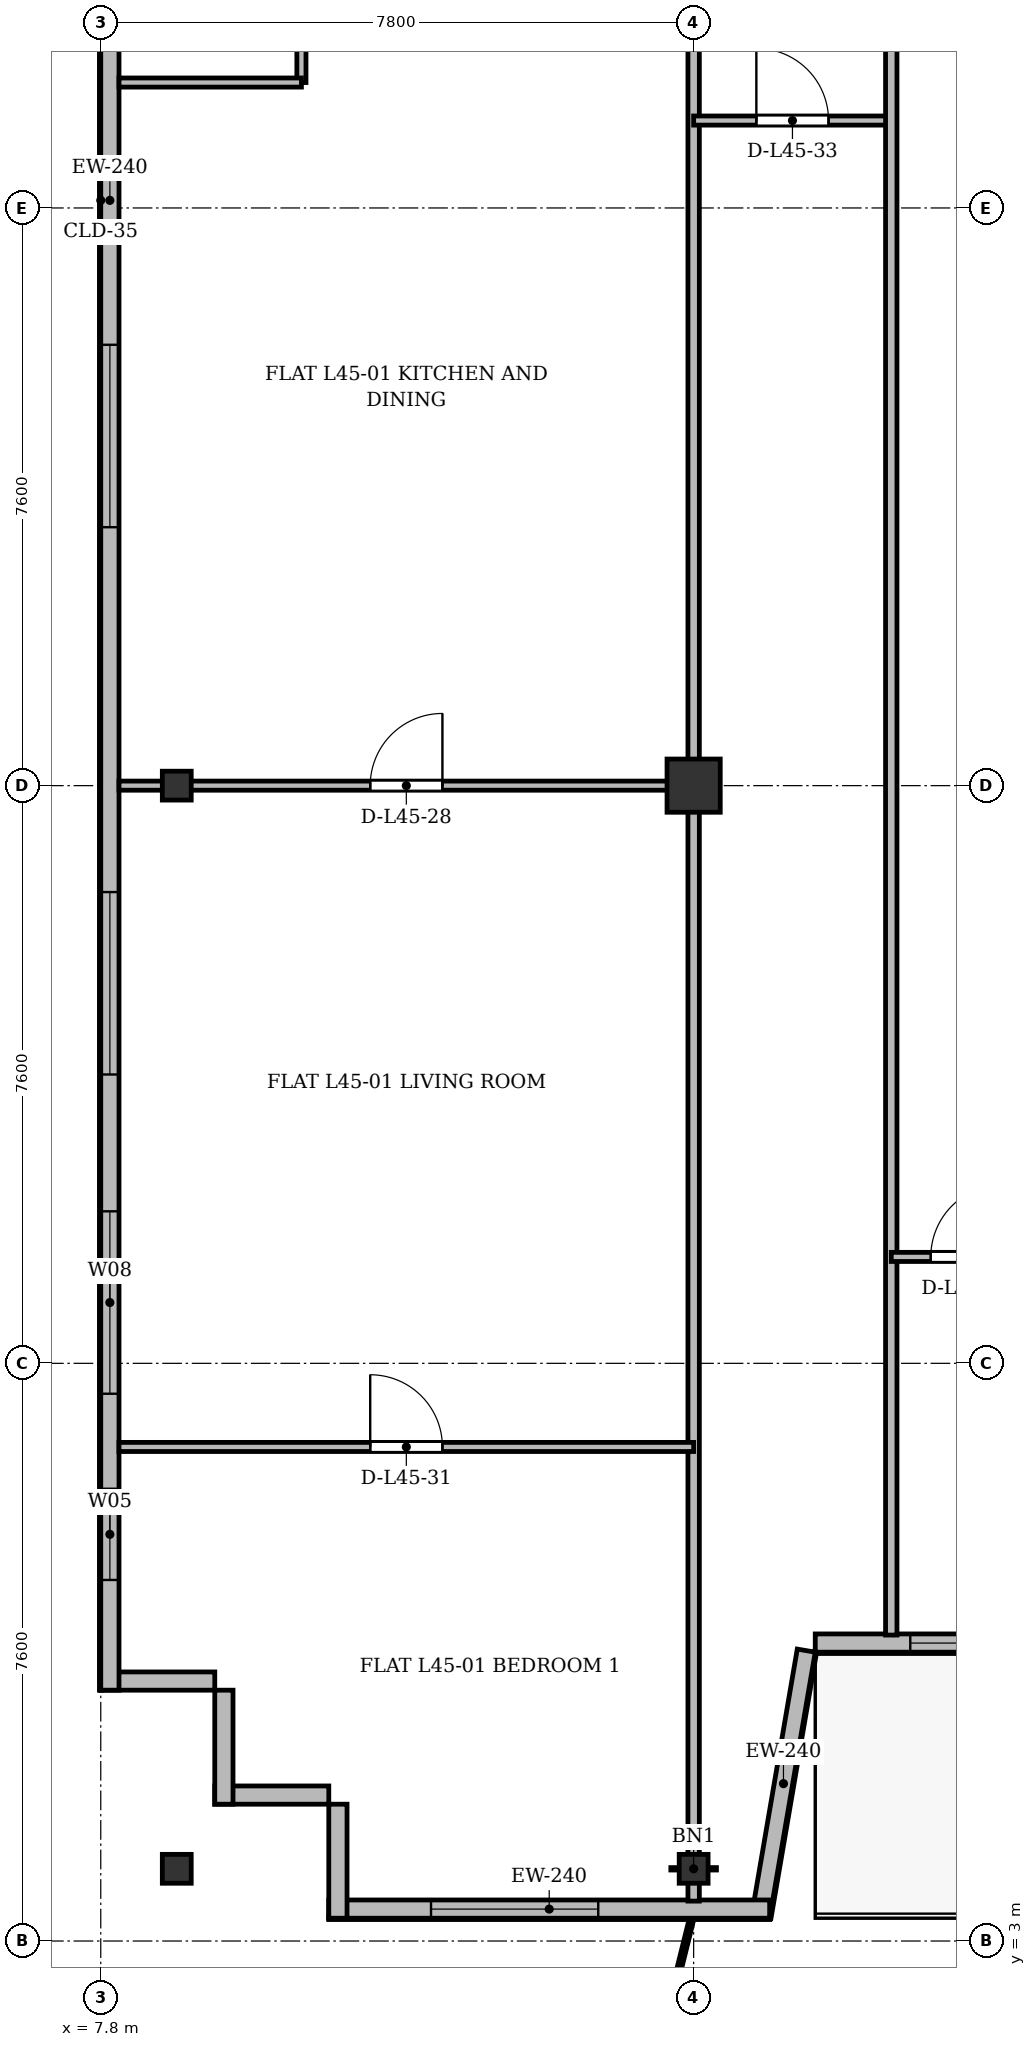
"""IFC4 building model, lengths in metres.
Left out: names, types, materials, properties, quantities, classifications, styles, units other than length and angle.
Written with IfcOpenShell. Run it as: python <this file> out.ifc"""

import sys

from ifc_helpers import new_model, si_unit, direction, frame, frame_2d, origin, origin_2d, place, context, subcontext, project, spatial, rectangle, i_section, extrude, source, transform, mapped, element, fill, save


model = new_model("IFC4")
c1 = context("Model", 3, precision=1e-05, world=origin(), true_north=direction((0.0, 1.0)))
c2 = subcontext(c1, "Body", "Model", "MODEL_VIEW")
j1 = project(units=[si_unit("LENGTHUNIT", "METRE"), si_unit("PLANEANGLEUNIT", "RADIAN")], contexts=[c1])
p1 = place(None, origin())
s1 = spatial("IfcSite", under=j1, at=p1, CompositionType="ELEMENT")
p2 = place(p1, origin())
s2 = spatial("IfcBuilding", under=s1, at=p2, CompositionType="ELEMENT")
p3 = place(p2, frame((0.0, 0.0, 171.7)))
s3 = spatial("IfcBuildingStorey", under=s2, at=p3, CompositionType="ELEMENT", Elevation=171.7)
m1 = source(origin(), c2, "Body", "SweptSolid", [
    extrude(i_section(OverallWidth=0.38, OverallDepth=0.38, WebThickness=0.02, FlangeThickness=0.03, at=origin_2d()), origin(), (0.0, 0.0, 1.0), 3.6),
])
for number, where, z_axis, x_axis in (
    (1, (8.8, 3.95, 0.0), (0.0, 0.0, 1.0), (1.0, 0.0, 0.0)),
    (2, (8.8, 18.2, 0.0), (0.0, 0.0, 1.0), (1.0, 0.0, 0.0)),
    (3, (15.6, 3.95, 0.0), (0.0, 0.0, 1.0), (1.0, 0.0, 0.0)),
):
    element("IfcColumn", number, at=place(p3, frame(where, z_axis=z_axis, x_axis=x_axis)), inside=s3, PredefinedType="COLUMN", context=c2, shape_type="MappedRepresentation", body=[
        mapped(m1, transform((0.0, 0.0, 0.0), x_axis=(1.0, 0.0, 0.0), y_axis=(0.0, 1.0, 0.0), z_axis=(0.0, 0.0, 1.0), scale=1.0)),
    ])
m2 = source(origin(), c2, "Body", "SweptSolid", [
    extrude(rectangle(XDim=0.7, YDim=0.7, at=origin_2d()), origin(), (0.0, 0.0, 1.0), 3.6),
])
p4 = place(p3, frame((15.6, 18.2, 0.0), z_axis=(0.0, 0.0, 1.0), x_axis=(1.0, 0.0, 0.0)))
e4 = element("IfcColumn", 4, at=p4, inside=s3, PredefinedType="COLUMN", context=c2, shape_type="MappedRepresentation", body=[
    mapped(m2, transform((0.0, 0.0, 0.0), x_axis=(1.0, 0.0, 0.0), y_axis=(0.0, 1.0, 0.0), z_axis=(0.0, 0.0, 1.0), scale=1.0)),
])
for number, where, z_axis, x_axis in (
    (5, (10.8, 4.92, 0.0), (0.0, 0.0, 1.0), (-1.0, 0.0, 0.0)),
    (6, (9.42, 4.8, 0.0), (0.0, 0.0, 1.0), (0.0, 1.0, 0.0)),
):
    element("IfcWall", number, at=place(p3, frame(where, z_axis=z_axis, x_axis=x_axis)), inside=s3, PredefinedType="SOLIDWALL", context=c2, shape_type="SweptSolid", body=[
        extrude(rectangle(XDim=1.5, YDim=0.24, at=frame_2d((0.75, 0.0))), origin(), (0.0, 0.0, 1.0), 3.35),
    ])
p5 = place(p3, frame((9.3, 6.42, 0.0), z_axis=(0.0, 0.0, 1.0), x_axis=(-1.0, 0.0, 0.0)))
e7 = element("IfcWall", 7, at=p5, inside=s3, PredefinedType="SOLIDWALL", context=c2, shape_type="SweptSolid", body=[
    extrude(rectangle(XDim=1.5, YDim=0.24, at=frame_2d((0.75, 0.0))), origin(), (0.0, 0.0, 1.0), 2.85),
])
p6 = place(p3, frame((7.92, 6.3, 0.0), z_axis=(0.0, 0.0, 1.0), x_axis=(0.0, 1.0, 0.0)))
e8 = element("IfcWall", 8, at=p6, inside=s3, PredefinedType="SOLIDWALL", context=c2, shape_type="SweptSolid", body=[
    extrude(rectangle(XDim=39.2, YDim=0.24, at=frame_2d((19.6, 0.0))), origin(), (0.0, 0.0, 1.0), 3.35),
])
p7 = place(p6, frame((1.45, 0.0, 0.92)))
e9 = element("IfcOpeningElement", 9, at=p7, cuts=e8, PredefinedType="OPENING", context=c2, shape_type="SweptSolid", body=[
    extrude(rectangle(XDim=1.2, YDim=1.65, at=frame_2d((0.6, 0.825))), frame((0.0, 0.13, 0.0), z_axis=(0.0, -1.0, 0.0), x_axis=(1.0, 0.0, 0.0)), (0.0, 0.0, 1.0), 0.26),
])
p8 = place(p6, frame((3.9, 0.0, 0.92)))
e10 = element("IfcOpeningElement", 10, at=p8, cuts=e8, PredefinedType="OPENING", context=c2, shape_type="SweptSolid", body=[
    extrude(rectangle(XDim=2.4, YDim=2.1, at=frame_2d((1.2, 1.05))), frame((0.0, 0.13, 0.0), z_axis=(0.0, -1.0, 0.0), x_axis=(1.0, 0.0, 0.0)), (0.0, 0.0, 1.0), 0.26),
])
p9 = place(p6, frame((8.1, 0.0, 0.92)))
e11 = element("IfcOpeningElement", 11, at=p9, cuts=e8, PredefinedType="OPENING", context=c2, shape_type="SweptSolid", body=[
    extrude(rectangle(XDim=2.4, YDim=2.1, at=frame_2d((1.2, 1.05))), frame((0.0, 0.13, 0.0), z_axis=(0.0, -1.0, 0.0), x_axis=(1.0, 0.0, 0.0)), (0.0, 0.0, 1.0), 0.26),
])
p10 = place(p6, frame((15.3, 0.0, 0.92)))
e12 = element("IfcOpeningElement", 12, at=p10, cuts=e8, PredefinedType="OPENING", context=c2, shape_type="SweptSolid", body=[
    extrude(rectangle(XDim=2.4, YDim=2.1, at=frame_2d((1.2, 1.05))), frame((0.0, 0.13, 0.0), z_axis=(0.0, -1.0, 0.0), x_axis=(1.0, 0.0, 0.0)), (0.0, 0.0, 1.0), 0.26),
])
p11 = place(p6, frame((33.5, 0.0, 0.92)))
e13 = element("IfcOpeningElement", 13, at=p11, cuts=e8, PredefinedType="OPENING", context=c2, shape_type="SweptSolid", body=[
    extrude(rectangle(XDim=1.2, YDim=1.65, at=frame_2d((0.6, 0.825))), frame((0.0, 0.13, 0.0), z_axis=(0.0, -1.0, 0.0), x_axis=(1.0, 0.0, 0.0)), (0.0, 0.0, 1.0), 0.26),
])
p12 = place(p6, frame((36.85, 0.0, 0.92)))
e14 = element("IfcOpeningElement", 14, at=p12, cuts=e8, PredefinedType="OPENING", context=c2, shape_type="SweptSolid", body=[
    extrude(rectangle(XDim=1.2, YDim=1.65, at=frame_2d((0.6, 0.825))), frame((0.0, 0.13, 0.0), z_axis=(0.0, -1.0, 0.0), x_axis=(1.0, 0.0, 0.0)), (0.0, 0.0, 1.0), 0.26),
])
p13 = place(p3, frame((29.0, 6.92, 0.0), z_axis=(0.0, 0.0, 1.0), x_axis=(-1.0, 0.0, 0.0)))
e15 = element("IfcWall", 15, at=p13, inside=s3, PredefinedType="SOLIDWALL", context=c2, shape_type="SweptSolid", body=[
    extrude(rectangle(XDim=11.8, YDim=0.24, at=frame_2d((5.9, 0.0))), origin(), (0.0, 0.0, 1.0), 2.85),
])
p14 = place(p13, frame((0.745, 0.0, 0.9)))
e16 = element("IfcOpeningElement", 16, at=p14, cuts=e15, PredefinedType="OPENING", context=c2, shape_type="SweptSolid", body=[
    extrude(rectangle(XDim=1.8, YDim=1.8, at=frame_2d((0.9, 0.9))), frame((0.0, 0.13, 0.0), z_axis=(0.0, -1.0, 0.0), x_axis=(1.0, 0.0, 0.0)), (0.0, 0.0, 1.0), 0.26),
])
p15 = place(p13, frame((3.5, 0.0, 0.9)))
e17 = element("IfcOpeningElement", 17, at=p15, cuts=e15, PredefinedType="OPENING", context=c2, shape_type="SweptSolid", body=[
    extrude(rectangle(XDim=2.2, YDim=1.8, at=frame_2d((1.1, 0.9))), frame((0.0, 0.13, 0.0), z_axis=(0.0, -1.0, 0.0), x_axis=(1.0, 0.0, 0.0)), (0.0, 0.0, 1.0), 0.26),
])
p16 = place(p13, frame((6.65, 0.0, 0.9)))
e18 = element("IfcOpeningElement", 18, at=p16, cuts=e15, PredefinedType="OPENING", context=c2, shape_type="SweptSolid", body=[
    extrude(rectangle(XDim=1.5, YDim=1.75, at=frame_2d((0.75, 0.875))), frame((0.0, 0.13, 0.0), z_axis=(0.0, -1.0, 0.0), x_axis=(1.0, 0.0, 0.0)), (0.0, 0.0, 1.0), 0.26),
])
p17 = place(p13, frame((9.05, 0.0, 0.9)))
e19 = element("IfcOpeningElement", 19, at=p17, cuts=e15, PredefinedType="OPENING", context=c2, shape_type="SweptSolid", body=[
    extrude(rectangle(XDim=1.5, YDim=1.75, at=frame_2d((0.75, 0.875))), frame((0.0, 0.13, 0.0), z_axis=(0.0, -1.0, 0.0), x_axis=(1.0, 0.0, 0.0)), (0.0, 0.0, 1.0), 0.26),
])
p18 = place(p3, frame((17.082, 6.82, 0.0), z_axis=(0.0, 0.0, 1.0), x_axis=(-0.168990530437, -0.98561767467, 0.0)))
e20 = element("IfcWall", 20, at=p18, inside=s3, PredefinedType="SOLIDWALL", context=c2, shape_type="SweptSolid", body=[
    extrude(rectangle(XDim=3.551, YDim=0.24, at=frame_2d((1.775, 0.0))), origin(), (0.0, 0.0, 1.0), 2.75),
])
p19 = place(p3, frame((16.6, 3.42, 0.0), z_axis=(0.0, 0.0, 1.0), x_axis=(-1.0, 0.0, 0.0)))
e21 = element("IfcWall", 21, at=p19, inside=s3, PredefinedType="SOLIDWALL", context=c2, shape_type="SweptSolid", body=[
    extrude(rectangle(XDim=5.8, YDim=0.24, at=frame_2d((2.9, 0.0))), origin(), (0.0, 0.0, 1.0), 3.35),
])
p20 = place(p19, frame((2.255, 0.0, 0.9)))
e22 = element("IfcOpeningElement", 22, at=p20, cuts=e21, PredefinedType="OPENING", context=c2, shape_type="SweptSolid", body=[
    extrude(rectangle(XDim=2.2, YDim=1.8, at=frame_2d((1.1, 0.9))), frame((0.0, 0.13, 0.0), z_axis=(0.0, -1.0, 0.0), x_axis=(1.0, 0.0, 0.0)), (0.0, 0.0, 1.0), 0.26),
])
p21 = place(p3, frame((10.92, 3.3, 0.0), z_axis=(0.0, 0.0, 1.0), x_axis=(0.0, 1.0, 0.0)))
e23 = element("IfcWall", 23, at=p21, inside=s3, PredefinedType="SOLIDWALL", context=c2, shape_type="SweptSolid", body=[
    extrude(rectangle(XDim=1.5, YDim=0.24, at=frame_2d((0.75, 0.0))), origin(), (0.0, 0.0, 1.0), 2.75),
])
p22 = place(p3, frame((15.6, 3.525, 0.0), z_axis=(0.0, 0.0, 1.0), x_axis=(0.0, 1.0, 0.0)))
e24 = element("IfcWall", 24, at=p22, inside=s3, PredefinedType="PARTITIONING", context=c2, shape_type="SweptSolid", body=[
    extrude(rectangle(XDim=27.275, YDim=0.15, at=frame_2d((13.638, 0.0))), origin(), (0.0, 0.0, 1.0), 2.85),
])
p23 = place(p3, frame((8.04, 18.2, 0.0), z_axis=(0.0, 0.0, 1.0), x_axis=(1.0, 0.0, 0.0)))
e25 = element("IfcWall", 25, at=p23, inside=s3, PredefinedType="PARTITIONING", context=c2, shape_type="SweptSolid", body=[
    extrude(rectangle(XDim=7.56, YDim=0.12, at=frame_2d((3.78, 0.0))), origin(), (0.0, 0.0, 1.0), 2.75),
])
p24 = place(p23, frame((3.305, 0.0, 0.0)))
e26 = element("IfcOpeningElement", 26, at=p24, cuts=e25, PredefinedType="OPENING", context=c2, shape_type="SweptSolid", body=[
    extrude(rectangle(XDim=0.95, YDim=2.15, at=frame_2d((0.475, 1.075))), frame((0.0, 0.07, 0.0), z_axis=(0.0, -1.0, 0.0), x_axis=(1.0, 0.0, 0.0)), (0.0, 0.0, 1.0), 0.14),
])
p25 = place(p3, frame((10.44, 27.45, 0.0), z_axis=(0.0, 0.0, 1.0), x_axis=(0.0, 1.0, 0.0)))
e27 = element("IfcWall", 27, at=p25, inside=s3, PredefinedType="PARTITIONING", context=c2, shape_type="SweptSolid", body=[
    extrude(rectangle(XDim=3.35, YDim=0.12, at=frame_2d((1.675, 0.0))), origin(), (0.0, 0.0, 1.0), 3.35),
])
p26 = place(p25, frame((0.8, 0.0, 0.0)))
e28 = element("IfcOpeningElement", 28, at=p26, cuts=e27, PredefinedType="OPENING", context=c2, shape_type="SweptSolid", body=[
    extrude(rectangle(XDim=0.85, YDim=2.1, at=frame_2d((0.425, 1.05))), frame((0.0, 0.07, 0.0), z_axis=(0.0, -1.0, 0.0), x_axis=(1.0, 0.0, 0.0)), (0.0, 0.0, 1.0), 0.14),
])
p27 = place(p3, frame((8.04, 27.45, 0.0), z_axis=(0.0, 0.0, 1.0), x_axis=(1.0, 0.0, 0.0)))
e29 = element("IfcWall", 29, at=p27, inside=s3, PredefinedType="PARTITIONING", context=c2, shape_type="SweptSolid", body=[
    extrude(rectangle(XDim=2.4, YDim=0.12, at=frame_2d((1.2, 0.0))), origin(), (0.0, 0.0, 1.0), 2.85),
])
p28 = place(p3, frame((8.04, 9.5, 0.0), z_axis=(0.0, 0.0, 1.0), x_axis=(1.0, 0.0, 0.0)))
e30 = element("IfcWall", 30, at=p28, inside=s3, PredefinedType="PARTITIONING", context=c2, shape_type="SweptSolid", body=[
    extrude(rectangle(XDim=7.56, YDim=0.12, at=frame_2d((3.78, 0.0))), origin(), (0.0, 0.0, 1.0), 2.85),
])
p29 = place(p28, frame((3.305, 0.0, 0.0)))
e31 = element("IfcOpeningElement", 31, at=p29, cuts=e30, PredefinedType="OPENING", context=c2, shape_type="SweptSolid", body=[
    extrude(rectangle(XDim=0.95, YDim=2.15, at=frame_2d((0.475, 1.075))), frame((0.0, 0.07, 0.0), z_axis=(0.0, -1.0, 0.0), x_axis=(1.0, 0.0, 0.0)), (0.0, 0.0, 1.0), 0.14),
])
p30 = place(p3, frame((15.6, 26.95, 0.0), z_axis=(0.0, 0.0, 1.0), x_axis=(1.0, 0.0, 0.0)))
e32 = element("IfcWall", 32, at=p30, inside=s3, PredefinedType="PARTITIONING", context=c2, shape_type="SweptSolid", body=[
    extrude(rectangle(XDim=2.6, YDim=0.12, at=frame_2d((1.3, 0.0))), origin(), (0.0, 0.0, 1.0), 2.85),
])
p31 = place(p30, frame((0.825, 0.0, 0.0)))
e33 = element("IfcOpeningElement", 33, at=p31, cuts=e32, PredefinedType="OPENING", context=c2, shape_type="SweptSolid", body=[
    extrude(rectangle(XDim=0.95, YDim=2.15, at=frame_2d((0.475, 1.075))), frame((0.0, 0.07, 0.0), z_axis=(0.0, -1.0, 0.0), x_axis=(1.0, 0.0, 0.0)), (0.0, 0.0, 1.0), 0.14),
])
p32 = place(p3, frame((18.2, 7.025, 0.0), z_axis=(0.0, 0.0, 1.0), x_axis=(0.0, 1.0, 0.0)))
e34 = element("IfcWall", 34, at=p32, inside=s3, PredefinedType="PARTITIONING", context=c2, shape_type="SweptSolid", body=[
    extrude(rectangle(XDim=23.775, YDim=0.15, at=frame_2d((11.888, 0.0))), origin(), (0.0, 0.0, 1.0), 2.75),
])
p33 = place(p3, frame((18.2, 12.0, 0.0), z_axis=(0.0, 0.0, 1.0), x_axis=(1.0, 0.0, 0.0)))
e35 = element("IfcWall", 35, at=p33, inside=s3, PredefinedType="PARTITIONING", context=c2, shape_type="SweptSolid", body=[
    extrude(rectangle(XDim=2.0, YDim=0.12, at=frame_2d((1.0, 0.0))), origin(), (0.0, 0.0, 1.0), 3.35),
])
p34 = place(p33, frame((0.52, 0.0, 0.0)))
e36 = element("IfcOpeningElement", 36, at=p34, cuts=e35, PredefinedType="OPENING", context=c2, shape_type="SweptSolid", body=[
    extrude(rectangle(XDim=0.95, YDim=2.15, at=frame_2d((0.475, 1.075))), frame((0.0, 0.07, 0.0), z_axis=(0.0, -1.0, 0.0), x_axis=(1.0, 0.0, 0.0)), (0.0, 0.0, 1.0), 0.14),
])
m3 = source(origin(), c2, "Body", "SweptSolid", [
    extrude(rectangle(XDim=1.2, YDim=1.65, at=frame_2d((0.6, 0.825))), frame((0.0, 0.03, 0.0), z_axis=(0.0, -1.0, 0.0), x_axis=(1.0, 0.0, 0.0)), (0.0, 0.0, 1.0), 0.06),
])
p35 = place(p7, origin())
e37 = element("IfcWindow", 37, at=p35, inside=s3, PartitioningType="SINGLE_PANEL", PredefinedType="WINDOW", context=c2, shape_type="MappedRepresentation", body=[
    mapped(m3, transform((0.0, 0.0, 0.0), x_axis=(1.0, 0.0, 0.0), y_axis=(0.0, 1.0, 0.0), z_axis=(0.0, 0.0, 1.0), scale=1.0)),
])
fill(e9, e37)
m4 = source(origin(), c2, "Body", "SweptSolid", [
    extrude(rectangle(XDim=2.4, YDim=2.1, at=frame_2d((1.2, 1.05))), frame((0.0, 0.03, 0.0), z_axis=(0.0, -1.0, 0.0), x_axis=(1.0, 0.0, 0.0)), (0.0, 0.0, 1.0), 0.06),
])
p36 = place(p8, origin())
e38 = element("IfcWindow", 38, at=p36, inside=s3, PartitioningType="SINGLE_PANEL", PredefinedType="WINDOW", context=c2, shape_type="MappedRepresentation", body=[
    mapped(m4, transform((0.0, 0.0, 0.0), x_axis=(1.0, 0.0, 0.0), y_axis=(0.0, 1.0, 0.0), z_axis=(0.0, 0.0, 1.0), scale=1.0)),
])
fill(e10, e38)
p37 = place(p9, origin())
e39 = element("IfcWindow", 39, at=p37, inside=s3, PartitioningType="SINGLE_PANEL", PredefinedType="WINDOW", context=c2, shape_type="MappedRepresentation", body=[
    mapped(m4, transform((0.0, 0.0, 0.0), x_axis=(1.0, 0.0, 0.0), y_axis=(0.0, 1.0, 0.0), z_axis=(0.0, 0.0, 1.0), scale=1.0)),
])
fill(e11, e39)
p38 = place(p10, origin())
e40 = element("IfcWindow", 40, at=p38, inside=s3, PartitioningType="SINGLE_PANEL", PredefinedType="WINDOW", context=c2, shape_type="MappedRepresentation", body=[
    mapped(m4, transform((0.0, 0.0, 0.0), x_axis=(1.0, 0.0, 0.0), y_axis=(0.0, 1.0, 0.0), z_axis=(0.0, 0.0, 1.0), scale=1.0)),
])
fill(e12, e40)
m5 = source(origin(), c2, "Body", "SweptSolid", [
    extrude(rectangle(XDim=1.5, YDim=1.75, at=frame_2d((0.75, 0.875))), frame((0.0, 0.03, 0.0), z_axis=(0.0, -1.0, 0.0), x_axis=(1.0, 0.0, 0.0)), (0.0, 0.0, 1.0), 0.06),
])
p39 = place(p17, origin())
e41 = element("IfcWindow", 41, at=p39, inside=s3, PartitioningType="SINGLE_PANEL", PredefinedType="WINDOW", context=c2, shape_type="MappedRepresentation", body=[
    mapped(m5, transform((0.0, 0.0, 0.0), x_axis=(1.0, 0.0, 0.0), y_axis=(0.0, 1.0, 0.0), z_axis=(0.0, 0.0, 1.0), scale=1.0)),
])
fill(e19, e41)
m6 = source(origin(), c2, "Body", "SweptSolid", [
    extrude(rectangle(XDim=2.2, YDim=1.8, at=frame_2d((1.1, 0.9))), frame((0.0, 0.03, 0.0), z_axis=(0.0, -1.0, 0.0), x_axis=(1.0, 0.0, 0.0)), (0.0, 0.0, 1.0), 0.06),
])
p40 = place(p20, origin())
e42 = element("IfcWindow", 42, at=p40, inside=s3, PartitioningType="SINGLE_PANEL", PredefinedType="WINDOW", context=c2, shape_type="MappedRepresentation", body=[
    mapped(m6, transform((0.0, 0.0, 0.0), x_axis=(1.0, 0.0, 0.0), y_axis=(0.0, 1.0, 0.0), z_axis=(0.0, 0.0, 1.0), scale=1.0)),
])
fill(e22, e42)
m7 = source(origin(), c2, "Body", "SweptSolid", [
    extrude(rectangle(XDim=0.95, YDim=2.15, at=frame_2d((0.475, 1.075))), frame((0.0, 0.025, 0.0), z_axis=(0.0, -1.0, 0.0), x_axis=(1.0, 0.0, 0.0)), (0.0, 0.0, 1.0), 0.05),
])
p41 = place(p24, origin())
e43 = element("IfcDoor", 43, at=p41, inside=s3, OperationType="SINGLE_SWING_RIGHT", PredefinedType="DOOR", context=c2, shape_type="MappedRepresentation", body=[
    mapped(m7, transform((0.0, 0.0, 0.0), x_axis=(1.0, 0.0, 0.0), y_axis=(0.0, 1.0, 0.0), z_axis=(0.0, 0.0, 1.0), scale=1.0)),
])
fill(e26, e43)
p42 = place(p29, origin())
e44 = element("IfcDoor", 44, at=p42, inside=s3, OperationType="SINGLE_SWING_LEFT", PredefinedType="DOOR", context=c2, shape_type="MappedRepresentation", body=[
    mapped(m7, transform((0.0, 0.0, 0.0), x_axis=(1.0, 0.0, 0.0), y_axis=(0.0, 1.0, 0.0), z_axis=(0.0, 0.0, 1.0), scale=1.0)),
])
fill(e31, e44)
p43 = place(p31, origin())
e45 = element("IfcDoor", 45, at=p43, inside=s3, OperationType="SINGLE_SWING_LEFT", PredefinedType="DOOR", context=c2, shape_type="MappedRepresentation", body=[
    mapped(m7, transform((0.0, 0.0, 0.0), x_axis=(1.0, 0.0, 0.0), y_axis=(0.0, 1.0, 0.0), z_axis=(0.0, 0.0, 1.0), scale=1.0)),
])
fill(e33, e45)
p44 = place(p34, origin())
e46 = element("IfcDoor", 46, at=p44, inside=s3, OperationType="SINGLE_SWING_RIGHT", PredefinedType="DOOR", context=c2, shape_type="MappedRepresentation", body=[
    mapped(m7, transform((0.0, 0.0, 0.0), x_axis=(1.0, 0.0, 0.0), y_axis=(0.0, 1.0, 0.0), z_axis=(0.0, 0.0, 1.0), scale=1.0)),
])
fill(e36, e46)
save(model, sys.argv[1])
